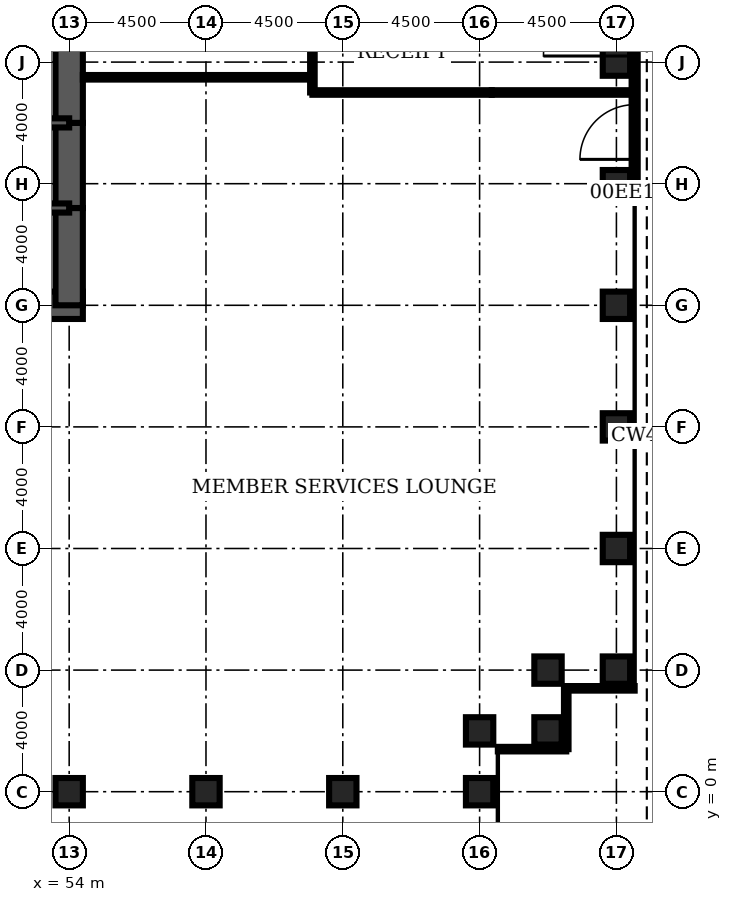
"""IFC4 building model, lengths in metres.
Left out: names, types, materials, properties, quantities, classifications, styles, units other than length and angle.
Written with IfcOpenShell. Run it as: python <this file> out.ifc"""

import sys

from ifc_helpers import new_model, si_unit, direction, frame, frame_2d, origin, origin_2d, place, context, subcontext, project, spatial, rectangle, hollow_rectangle, extrude, element, fill, save


model = new_model("IFC4")
c1 = context("Model", 3, precision=1e-05, world=origin(), true_north=direction((0.0, 1.0)))
c2 = subcontext(c1, "Body", "Model", "MODEL_VIEW")
j1 = project(units=[si_unit("LENGTHUNIT", "METRE"), si_unit("PLANEANGLEUNIT", "RADIAN")], contexts=[c1])
p1 = place(None, origin())
s1 = spatial("IfcSite", under=j1, at=p1, CompositionType="ELEMENT")
p2 = place(p1, origin())
s2 = spatial("IfcBuilding", under=s1, at=p2, CompositionType="ELEMENT")
p3 = place(p2, origin())
s3 = spatial("IfcBuildingStorey", under=s2, at=p3, CompositionType="ELEMENT", Elevation=0.0)
for number, where, z_axis, x_axis in (
    (1, (54.0, 0.0, 0.0), (0.0, 0.0, 1.0), (0.0, 1.0, 0.0)),
    (2, (58.5, 0.0, 0.0), (0.0, 0.0, 1.0), (0.0, 1.0, 0.0)),
    (3, (63.0, 0.0, 0.0), (0.0, 0.0, 1.0), (0.0, 1.0, 0.0)),
    (4, (67.5, 0.0, 0.0), (0.0, 0.0, 1.0), (0.0, 1.0, 0.0)),
    (5, (67.5, 2.0, 0.0), (0.0, 0.0, 1.0), (0.0, 1.0, 0.0)),
    (6, (69.75, 2.0, 0.0), (0.0, 0.0, 1.0), (1.0, 0.0, 0.0)),
    (7, (69.75, 4.0, 0.0), (0.0, 0.0, 1.0), (1.0, 0.0, 0.0)),
    (8, (72.0, 4.0, 0.0), (0.0, 0.0, 1.0), (1.0, 0.0, 0.0)),
    (9, (72.0, 8.0, 0.0), (0.0, 0.0, 1.0), (1.0, 0.0, 0.0)),
    (10, (72.0, 12.0, 0.0), (0.0, 0.0, 1.0), (1.0, 0.0, 0.0)),
    (11, (72.0, 16.0, 0.0), (0.0, 0.0, 1.0), (1.0, 0.0, 0.0)),
    (12, (72.0, 20.0, 0.0), (0.0, 0.0, 1.0), (1.0, 0.0, 0.0)),
    (13, (72.0, 24.0, 0.0), (0.0, 0.0, 1.0), (1.0, 0.0, 0.0)),
):
    element("IfcColumn", number, at=place(p3, frame(where, z_axis=z_axis, x_axis=x_axis)), inside=s3, PredefinedType="COLUMN", context=c2, shape_type="SweptSolid", body=[
        extrude(hollow_rectangle(XDim=0.9, YDim=0.9, WallThickness=0.12, at=origin_2d()), origin(), (0.0, 0.0, 1.0), 6.0),
    ])
p4 = place(p3, frame((45.0, 16.0, 0.0), z_axis=(0.0, 0.0, 1.0), x_axis=(1.0, 0.0, 0.0)))
e14 = element("IfcWall", 14, at=p4, inside=s3, PredefinedType="SHEAR", context=c2, shape_type="SweptSolid", body=[
    extrude(rectangle(XDim=9.45, YDim=0.9, at=frame_2d((4.725, 0.0))), origin(), (0.0, 0.0, 1.0), 6.0),
])
p5 = place(p3, frame((54.0, 16.0, 0.0), z_axis=(0.0, 0.0, 1.0), x_axis=(0.0, 1.0, 0.0)))
e15 = element("IfcWall", 15, at=p5, inside=s3, PredefinedType="SHEAR", context=c2, shape_type="SweptSolid", body=[
    extrude(rectangle(XDim=3.2, YDim=0.9, at=frame_2d((1.6, 0.0))), origin(), (0.0, 0.0, 1.0), 6.0),
])
p6 = place(p3, frame((54.0, 19.2, 0.0), z_axis=(0.0, 0.0, 1.0), x_axis=(0.0, 1.0, 0.0)))
e16 = element("IfcWall", 16, at=p6, inside=s3, PredefinedType="SHEAR", context=c2, shape_type="SweptSolid", body=[
    extrude(rectangle(XDim=2.8, YDim=0.9, at=frame_2d((1.4, 0.0))), origin(), (0.0, 0.0, 1.0), 6.0),
])
p7 = place(p6, frame((0.4, 0.0, 0.0)))
e17 = element("IfcOpeningElement", 17, at=p7, cuts=e16, PredefinedType="OPENING", context=c2, shape_type="SweptSolid", body=[
    extrude(rectangle(XDim=1.8, YDim=2.1, at=frame_2d((0.9, 1.05))), frame((0.0, 0.46, 0.0), z_axis=(0.0, -1.0, 0.0), x_axis=(1.0, 0.0, 0.0)), (0.0, 0.0, 1.0), 0.92),
])
p8 = place(p3, frame((54.0, 22.0, 0.0), z_axis=(0.0, 0.0, 1.0), x_axis=(0.0, 1.0, 0.0)))
e18 = element("IfcWall", 18, at=p8, inside=s3, PredefinedType="SHEAR", context=c2, shape_type="SweptSolid", body=[
    extrude(rectangle(XDim=4.0, YDim=0.9, at=frame_2d((2.0, 0.0))), origin(), (0.0, 0.0, 1.0), 6.0),
])
p9 = place(p3, frame((45.0, 19.2, 0.0), z_axis=(0.0, 0.0, 1.0), x_axis=(1.0, 0.0, 0.0)))
e19 = element("IfcWall", 19, at=p9, inside=s3, PredefinedType="SOLIDWALL", context=c2, shape_type="SweptSolid", body=[
    extrude(rectangle(XDim=9.0, YDim=0.3, at=frame_2d((4.5, 0.0))), origin(), (0.0, 0.0, 1.0), 6.0),
])
p10 = place(p9, frame((7.35, 0.0, 0.0)))
e20 = element("IfcOpeningElement", 20, at=p10, cuts=e19, PredefinedType="OPENING", context=c2, shape_type="SweptSolid", body=[
    extrude(rectangle(XDim=1.0, YDim=2.1, at=frame_2d((0.5, 1.05))), frame((0.0, 0.16, 0.0), z_axis=(0.0, -1.0, 0.0), x_axis=(1.0, 0.0, 0.0)), (0.0, 0.0, 1.0), 0.32),
])
p11 = place(p3, frame((48.0, 22.0, 0.0), z_axis=(0.0, 0.0, 1.0), x_axis=(1.0, 0.0, 0.0)))
e21 = element("IfcWall", 21, at=p11, inside=s3, PredefinedType="SOLIDWALL", context=c2, shape_type="SweptSolid", body=[
    extrude(rectangle(XDim=6.0, YDim=0.3, at=frame_2d((3.0, 0.0))), origin(), (0.0, 0.0, 1.0), 6.0),
])
p12 = place(p11, frame((2.0, 0.0, 0.0)))
e22 = element("IfcOpeningElement", 22, at=p12, cuts=e21, PredefinedType="OPENING", context=c2, shape_type="SweptSolid", body=[
    extrude(rectangle(XDim=1.0, YDim=2.1, at=frame_2d((0.5, 1.05))), frame((0.0, 0.16, 0.0), z_axis=(0.0, -1.0, 0.0), x_axis=(1.0, 0.0, 0.0)), (0.0, 0.0, 1.0), 0.32),
])
p13 = place(p11, frame((4.3, 0.0, 0.0)))
e23 = element("IfcOpeningElement", 23, at=p13, cuts=e21, PredefinedType="OPENING", context=c2, shape_type="SweptSolid", body=[
    extrude(rectangle(XDim=1.0, YDim=2.1, at=frame_2d((0.5, 1.05))), frame((0.0, 0.16, 0.0), z_axis=(0.0, -1.0, 0.0), x_axis=(1.0, 0.0, 0.0)), (0.0, 0.0, 1.0), 0.32),
])
p14 = place(p3, frame((67.9, 23.0, 0.0), z_axis=(0.0, 0.0, 1.0), x_axis=(1.0, 0.0, 0.0)))
e24 = element("IfcWall", 24, at=p14, inside=s3, PredefinedType="PARTITIONING", context=c2, shape_type="SweptSolid", body=[
    extrude(rectangle(XDim=4.6, YDim=0.15, at=frame_2d((2.3, 0.0))), origin(), (0.0, 0.0, 1.0), 3.0),
])
p15 = place(p3, frame((62.0, 23.0, 0.0), z_axis=(0.0, 0.0, 1.0), x_axis=(1.0, 0.0, 0.0)))
e25 = element("IfcWall", 25, at=p15, inside=s3, PredefinedType="PARTITIONING", context=c2, shape_type="SweptSolid", body=[
    extrude(rectangle(XDim=5.9, YDim=0.15, at=frame_2d((2.95, 0.0))), origin(), (0.0, 0.0, 1.0), 3.0),
])
p16 = place(p3, frame((62.0, 23.0, 0.0), z_axis=(0.0, 0.0, 1.0), x_axis=(0.0, 1.0, 0.0)))
e26 = element("IfcWall", 26, at=p16, inside=s3, PredefinedType="PARTITIONING", context=c2, shape_type="SweptSolid", body=[
    extrude(rectangle(XDim=6.0, YDim=0.15, at=frame_2d((3.0, 0.0))), origin(), (0.0, 0.0, 1.0), 3.0),
])
p17 = place(p16, frame((2.5, 0.0, 0.0)))
e27 = element("IfcOpeningElement", 27, at=p17, cuts=e26, PredefinedType="OPENING", context=c2, shape_type="SweptSolid", body=[
    extrude(rectangle(XDim=1.6, YDim=2.1, at=frame_2d((0.8, 1.05))), frame((0.0, 0.085, 0.0), z_axis=(0.0, -1.0, 0.0), x_axis=(1.0, 0.0, 0.0)), (0.0, 0.0, 1.0), 0.17),
])
p18 = place(p3, frame((54.45, 23.5, 0.0), z_axis=(0.0, 0.0, 1.0), x_axis=(1.0, 0.0, 0.0)))
e28 = element("IfcWall", 28, at=p18, inside=s3, PredefinedType="PARTITIONING", context=c2, shape_type="SweptSolid", body=[
    extrude(rectangle(XDim=7.55, YDim=0.15, at=frame_2d((3.775, 0.0))), origin(), (0.0, 0.0, 1.0), 3.0),
])
p19 = place(p3, frame((68.1, 1.4, 0.0), z_axis=(0.0, 0.0, 1.0), x_axis=(1.0, 0.0, 0.0)))
e29 = element("IfcWall", 29, at=p19, inside=s3, PredefinedType="ELEMENTEDWALL", context=c2, shape_type="SweptSolid", body=[
    extrude(rectangle(XDim=2.25, YDim=0.15, at=frame_2d((1.125, 0.0))), origin(), (0.0, 0.0, 1.0), 5.82),
])
p20 = place(p3, frame((70.35, 1.4, 0.0), z_axis=(0.0, 0.0, 1.0), x_axis=(0.0, 1.0, 0.0)))
e30 = element("IfcWall", 30, at=p20, inside=s3, PredefinedType="ELEMENTEDWALL", context=c2, shape_type="SweptSolid", body=[
    extrude(rectangle(XDim=2.0, YDim=0.15, at=frame_2d((1.0, 0.0))), origin(), (0.0, 0.0, 1.0), 5.82),
])
p21 = place(p3, frame((70.35, 3.4, 0.0), z_axis=(0.0, 0.0, 1.0), x_axis=(1.0, 0.0, 0.0)))
e31 = element("IfcWall", 31, at=p21, inside=s3, PredefinedType="ELEMENTEDWALL", context=c2, shape_type="SweptSolid", body=[
    extrude(rectangle(XDim=2.25, YDim=0.15, at=frame_2d((1.125, 0.0))), origin(), (0.0, 0.0, 1.0), 5.82),
])
p22 = place(p3, frame((72.6, 20.0, 0.0), z_axis=(0.0, 0.0, 1.0), x_axis=(0.0, 1.0, 0.0)))
e32 = element("IfcWall", 32, at=p22, inside=s3, PredefinedType="USERDEFINED", context=c2, shape_type="SweptSolid", body=[
    extrude(rectangle(XDim=8.0, YDim=0.2, at=frame_2d((4.0, 0.0))), origin(), (0.0, 0.0, 1.0), 5.82),
])
p23 = place(p22, frame((0.8, 0.0, 0.0)))
e33 = element("IfcOpeningElement", 33, at=p23, cuts=e32, PredefinedType="OPENING", context=c2, shape_type="SweptSolid", body=[
    extrude(rectangle(XDim=1.8, YDim=2.4, at=frame_2d((0.9, 1.2))), frame((0.0, 0.11, 0.0), z_axis=(0.0, -1.0, 0.0), x_axis=(1.0, 0.0, 0.0)), (0.0, 0.0, 1.0), 0.22),
])
p24 = place(p22, frame((4.2, 0.0, 0.0)))
e34 = element("IfcOpeningElement", 34, at=p24, cuts=e32, PredefinedType="OPENING", context=c2, shape_type="SweptSolid", body=[
    extrude(rectangle(XDim=3.0, YDim=3.5, at=frame_2d((1.5, 1.75))), frame((0.0, 0.11, 0.0), z_axis=(0.0, -1.0, 0.0), x_axis=(1.0, 0.0, 0.0)), (0.0, 0.0, 1.0), 0.22),
])
p25 = place(p23, origin())
e35 = element("IfcDoor", 35, at=p25, inside=s3, OperationType="SINGLE_SWING_LEFT", PredefinedType="DOOR", context=c2, shape_type="SweptSolid", body=[
    extrude(rectangle(XDim=1.8, YDim=2.4, at=frame_2d((0.9, 1.2))), frame((0.0, 0.025, 0.0), z_axis=(0.0, -1.0, 0.0), x_axis=(1.0, 0.0, 0.0)), (0.0, 0.0, 1.0), 0.05),
])
fill(e33, e35)
p26 = place(p24, origin())
e36 = element("IfcDoor", 36, at=p26, inside=s3, OperationType="SINGLE_SWING_LEFT", PredefinedType="USERDEFINED", context=c2, shape_type="SweptSolid", body=[
    extrude(rectangle(XDim=3.0, YDim=3.5, at=frame_2d((1.5, 1.75))), frame((0.0, 0.025, 0.0), z_axis=(0.0, -1.0, 0.0), x_axis=(1.0, 0.0, 0.0)), (0.0, 0.0, 1.0), 0.05),
])
fill(e34, e36)
p27 = place(p7, origin())
e37 = element("IfcDoor", 37, at=p27, inside=s3, OperationType="SINGLE_SWING_LEFT", PredefinedType="DOOR", context=c2, shape_type="SweptSolid", body=[
    extrude(rectangle(XDim=1.8, YDim=2.1, at=frame_2d((0.9, 1.05))), frame((0.0, 0.45, 0.0), z_axis=(0.0, -1.0, 0.0), x_axis=(1.0, 0.0, 0.0)), (0.0, 0.0, 1.0), 0.899),
])
fill(e17, e37)
save(model, sys.argv[1])
